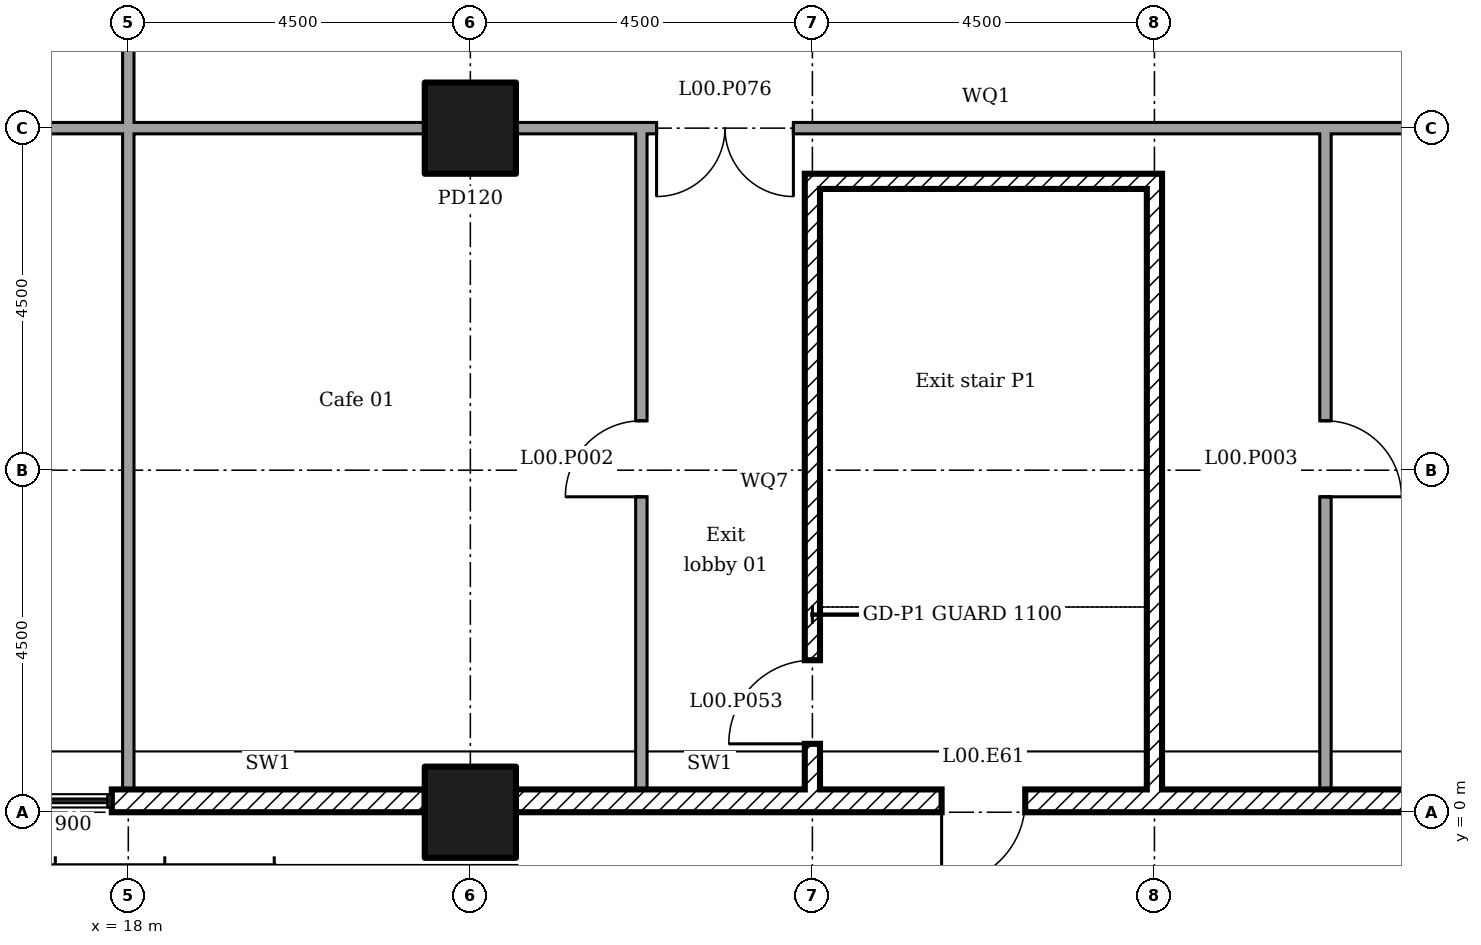
"""IFC4 building model, lengths in metres.
Left out: names, types, materials, properties, quantities, classifications, styles, units other than length and angle.
Written with IfcOpenShell. Run it as: python <this file> out.ifc"""

import sys

from ifc_helpers import new_model, si_unit, direction, frame, frame_2d, origin, origin_2d, place, context, subcontext, project, spatial, rectangle, extrude, element, fill, save


model = new_model("IFC4")
c1 = context("Model", 3, precision=1e-05, world=origin(), true_north=direction((0.0, 1.0)))
c2 = subcontext(c1, "Body", "Model", "MODEL_VIEW")
j1 = project(units=[si_unit("LENGTHUNIT", "METRE"), si_unit("PLANEANGLEUNIT", "RADIAN")], contexts=[c1])
p1 = place(None, origin())
s1 = spatial("IfcSite", under=j1, at=p1, CompositionType="ELEMENT")
p2 = place(p1, origin())
s2 = spatial("IfcBuilding", under=s1, at=p2, CompositionType="ELEMENT")
p3 = place(p2, origin())
s3 = spatial("IfcBuildingStorey", under=s2, at=p3, CompositionType="ELEMENT", Elevation=0.0)
for number, where in (
    (1, (22.5, 0.0, 0.0)),
    (2, (22.5, 9.0, 0.0)),
):
    element("IfcColumn", number, at=place(p3, frame(where)), inside=s3, PredefinedType="COLUMN", context=c2, shape_type="SweptSolid", body=[
        extrude(rectangle(XDim=1.2, YDim=1.2, at=origin_2d()), origin(), (0.0, 0.0, 1.0), 6.0),
    ])
p4 = place(p3, frame((17.783, 0.15, 0.0)))
e3 = element("IfcWall", 3, at=p4, inside=s3, PredefinedType="ELEMENTEDWALL", context=c2, shape_type="SweptSolid", body=[
    extrude(rectangle(XDim=4.116, YDim=0.3, at=frame_2d((2.058, 0.0))), origin(), (0.0, 0.0, 1.0), 5.55),
])
p5 = place(p3, frame((23.1, 0.15, 0.0)))
e4 = element("IfcWall", 4, at=p5, inside=s3, PredefinedType="ELEMENTEDWALL", context=c2, shape_type="SweptSolid", body=[
    extrude(rectangle(XDim=5.1, YDim=0.3, at=frame_2d((2.55, 0.0))), origin(), (0.0, 0.0, 1.0), 5.55),
])
p6 = place(p3, frame((28.2, 0.15, 0.0)))
e5 = element("IfcWall", 5, at=p6, inside=s3, PredefinedType="ELEMENTEDWALL", context=c2, shape_type="SweptSolid", body=[
    extrude(rectangle(XDim=2.1, YDim=0.3, at=frame_2d((1.05, 0.0))), origin(), (0.0, 0.0, 1.0), 5.55),
])
p7 = place(p6, frame((0.5, 0.0, 0.0)))
e6 = element("IfcOpeningElement", 6, at=p7, cuts=e5, PredefinedType="OPENING", context=c2, shape_type="SweptSolid", body=[
    extrude(rectangle(XDim=1.1, YDim=2.4, at=frame_2d((0.55, 1.2))), frame((0.0, 0.16, 0.0), z_axis=(0.0, -1.0, 0.0), x_axis=(1.0, 0.0, 0.0)), (0.0, 0.0, 1.0), 0.32),
])
p8 = place(p3, frame((30.3, 0.15, 0.0)))
e7 = element("IfcWall", 7, at=p8, inside=s3, PredefinedType="ELEMENTEDWALL", context=c2, shape_type="SweptSolid", body=[
    extrude(rectangle(XDim=5.1, YDim=0.3, at=frame_2d((2.55, 0.0))), origin(), (0.0, 0.0, 1.0), 5.55),
])
p9 = place(p3, frame((18.0, 0.3, 0.0), z_axis=(0.0, 0.0, 1.0), x_axis=(0.0, 1.0, 0.0)))
e8 = element("IfcWall", 8, at=p9, inside=s3, PredefinedType="PARTITIONING", context=c2, shape_type="SweptSolid", body=[
    extrude(rectangle(XDim=8.775, YDim=0.15, at=frame_2d((4.387, 0.0))), origin(), (0.0, 0.0, 1.0), 5.55),
])
p10 = place(p3, frame((9.595, 9.0, 0.0)))
e9 = element("IfcWall", 9, at=p10, inside=s3, PredefinedType="PARTITIONING", context=c2, shape_type="SweptSolid", body=[
    extrude(rectangle(XDim=8.48, YDim=0.15, at=frame_2d((4.24, 0.0))), origin(), (0.0, 0.0, 1.0), 5.55),
])
p11 = place(p10, frame((3.7, 0.0, 0.0)))
e10 = element("IfcOpeningElement", 10, at=p11, cuts=e9, PredefinedType="OPENING", context=c2, shape_type="SweptSolid", body=[
    extrude(rectangle(XDim=1.0, YDim=2.1, at=frame_2d((0.5, 1.05))), frame((0.0, 0.085, 0.0), z_axis=(0.0, -1.0, 0.0), x_axis=(1.0, 0.0, 0.0)), (0.0, 0.0, 1.0), 0.17),
])
p12 = place(p3, frame((24.75, 0.3, 0.0), z_axis=(0.0, 0.0, 1.0), x_axis=(0.0, 1.0, 0.0)))
e11 = element("IfcWall", 11, at=p12, inside=s3, PredefinedType="PARTITIONING", context=c2, shape_type="SweptSolid", body=[
    extrude(rectangle(XDim=8.775, YDim=0.15, at=frame_2d((4.387, 0.0))), origin(), (0.0, 0.0, 1.0), 5.55),
])
p13 = place(p12, frame((3.85, 0.0, 0.0)))
e12 = element("IfcOpeningElement", 12, at=p13, cuts=e11, PredefinedType="OPENING", context=c2, shape_type="SweptSolid", body=[
    extrude(rectangle(XDim=1.0, YDim=2.1, at=frame_2d((0.5, 1.05))), frame((0.0, 0.085, 0.0), z_axis=(0.0, -1.0, 0.0), x_axis=(1.0, 0.0, 0.0)), (0.0, 0.0, 1.0), 0.17),
])
p14 = place(p3, frame((18.075, 9.0, 0.0)))
e13 = element("IfcWall", 13, at=p14, inside=s3, PredefinedType="PARTITIONING", context=c2, shape_type="SweptSolid", body=[
    extrude(rectangle(XDim=3.83, YDim=0.15, at=frame_2d((1.915, 0.0))), origin(), (0.0, 0.0, 1.0), 5.55),
])
p15 = place(p3, frame((23.095, 9.0, 0.0)))
e14 = element("IfcWall", 14, at=p15, inside=s3, PredefinedType="PARTITIONING", context=c2, shape_type="SweptSolid", body=[
    extrude(rectangle(XDim=1.655, YDim=0.15, at=frame_2d((0.828, 0.0))), origin(), (0.0, 0.0, 1.0), 5.55),
])
p16 = place(p3, frame((33.75, 0.3, 0.0), z_axis=(0.0, 0.0, 1.0), x_axis=(0.0, 1.0, 0.0)))
e15 = element("IfcWall", 15, at=p16, inside=s3, PredefinedType="PARTITIONING", context=c2, shape_type="SweptSolid", body=[
    extrude(rectangle(XDim=8.775, YDim=0.15, at=frame_2d((4.387, 0.0))), origin(), (0.0, 0.0, 1.0), 5.55),
])
p17 = place(p16, frame((3.85, 0.0, 0.0)))
e16 = element("IfcOpeningElement", 16, at=p17, cuts=e15, PredefinedType="OPENING", context=c2, shape_type="SweptSolid", body=[
    extrude(rectangle(XDim=1.0, YDim=2.1, at=frame_2d((0.5, 1.05))), frame((0.0, 0.085, 0.0), z_axis=(0.0, -1.0, 0.0), x_axis=(1.0, 0.0, 0.0)), (0.0, 0.0, 1.0), 0.17),
])
p18 = place(p3, frame((24.825, 9.0, 0.0)))
e17 = element("IfcWall", 17, at=p18, inside=s3, PredefinedType="PARTITIONING", context=c2, shape_type="SweptSolid", body=[
    extrude(rectangle(XDim=8.925, YDim=0.15, at=frame_2d((4.462, 0.0))), origin(), (0.0, 0.0, 1.0), 5.55),
])
p19 = place(p18, frame((0.125, 0.0, 0.0)))
e18 = element("IfcOpeningElement", 18, at=p19, cuts=e17, PredefinedType="OPENING", context=c2, shape_type="SweptSolid", body=[
    extrude(rectangle(XDim=1.8, YDim=2.1, at=frame_2d((0.9, 1.05))), frame((0.0, 0.085, 0.0), z_axis=(0.0, -1.0, 0.0), x_axis=(1.0, 0.0, 0.0)), (0.0, 0.0, 1.0), 0.17),
])
p20 = place(p3, frame((27.0, 0.3, 0.0), z_axis=(0.0, 0.0, 1.0), x_axis=(0.0, 1.0, 0.0)))
e19 = element("IfcWall", 19, at=p20, inside=s3, PredefinedType="SOLIDWALL", context=c2, shape_type="SweptSolid", body=[
    extrude(rectangle(XDim=8.1, YDim=0.2, at=frame_2d((4.05, 0.0))), origin(), (0.0, 0.0, 1.0), 5.55),
])
p21 = place(p20, frame((0.6, 0.0, 0.0)))
e20 = element("IfcOpeningElement", 20, at=p21, cuts=e19, PredefinedType="OPENING", context=c2, shape_type="SweptSolid", body=[
    extrude(rectangle(XDim=1.1, YDim=2.1, at=frame_2d((0.55, 1.05))), frame((0.0, 0.11, 0.0), z_axis=(0.0, -1.0, 0.0), x_axis=(1.0, 0.0, 0.0)), (0.0, 0.0, 1.0), 0.22),
])
p22 = place(p3, frame((31.5, 0.3, 0.0), z_axis=(0.0, 0.0, 1.0), x_axis=(0.0, 1.0, 0.0)))
e21 = element("IfcWall", 21, at=p22, inside=s3, PredefinedType="SOLIDWALL", context=c2, shape_type="SweptSolid", body=[
    extrude(rectangle(XDim=8.1, YDim=0.2, at=frame_2d((4.05, 0.0))), origin(), (0.0, 0.0, 1.0), 5.55),
])
p23 = place(p3, frame((27.1, 8.3, 0.0)))
e22 = element("IfcWall", 22, at=p23, inside=s3, PredefinedType="SOLIDWALL", context=c2, shape_type="SweptSolid", body=[
    extrude(rectangle(XDim=4.3, YDim=0.2, at=frame_2d((2.15, 0.0))), origin(), (0.0, 0.0, 1.0), 5.55),
])
p24 = place(p3, frame((33.825, 9.0, 0.0)))
e23 = element("IfcWall", 23, at=p24, inside=s3, PredefinedType="PARTITIONING", context=c2, shape_type="SweptSolid", body=[
    extrude(rectangle(XDim=1.58, YDim=0.15, at=frame_2d((0.79, 0.0))), origin(), (0.0, 0.0, 1.0), 5.55),
])
p25 = place(p3, frame((18.0, 9.075, 0.0), z_axis=(0.0, 0.0, 1.0), x_axis=(0.0, 1.0, 0.0)))
e24 = element("IfcWall", 24, at=p25, inside=s3, PredefinedType="PARTITIONING", context=c2, shape_type="SweptSolid", body=[
    extrude(rectangle(XDim=9.0, YDim=0.15, at=frame_2d((4.5, 0.0))), origin(), (0.0, 0.0, 1.0), 5.55),
])
p26 = place(p25, frame((3.525, 0.0, 0.0)))
e25 = element("IfcOpeningElement", 25, at=p26, cuts=e24, PredefinedType="OPENING", context=c2, shape_type="SweptSolid", body=[
    extrude(rectangle(XDim=1.8, YDim=2.1, at=frame_2d((0.9, 1.05))), frame((0.0, 0.085, 0.0), z_axis=(0.0, -1.0, 0.0), x_axis=(1.0, 0.0, 0.0)), (0.0, 0.0, 1.0), 0.17),
])
p27 = place(p7, frame((1.1, 0.0, 0.0), x_axis=(-1.0, 0.0, 0.0)))
e26 = element("IfcDoor", 26, at=p27, inside=s3, OperationType="SINGLE_SWING_LEFT", PredefinedType="NOTDEFINED", context=c2, shape_type="SweptSolid", body=[
    extrude(rectangle(XDim=1.1, YDim=2.4, at=frame_2d((0.55, 1.2))), frame((0.0, 0.025, 0.0), z_axis=(0.0, -1.0, 0.0), x_axis=(1.0, 0.0, 0.0)), (0.0, 0.0, 1.0), 0.05),
])
fill(e6, e26)
p28 = place(p13, origin())
e27 = element("IfcDoor", 27, at=p28, inside=s3, OperationType="SINGLE_SWING_RIGHT", PredefinedType="DOOR", context=c2, shape_type="SweptSolid", body=[
    extrude(rectangle(XDim=1.0, YDim=2.1, at=frame_2d((0.5, 1.05))), frame((0.0, 0.025, 0.0), z_axis=(0.0, -1.0, 0.0), x_axis=(1.0, 0.0, 0.0)), (0.0, 0.0, 1.0), 0.05),
])
fill(e12, e27)
p29 = place(p17, frame((1.0, 0.0, 0.0), x_axis=(-1.0, 0.0, 0.0)))
e28 = element("IfcDoor", 28, at=p29, inside=s3, OperationType="SINGLE_SWING_LEFT", PredefinedType="DOOR", context=c2, shape_type="SweptSolid", body=[
    extrude(rectangle(XDim=1.0, YDim=2.1, at=frame_2d((0.5, 1.05))), frame((0.0, 0.025, 0.0), z_axis=(0.0, -1.0, 0.0), x_axis=(1.0, 0.0, 0.0)), (0.0, 0.0, 1.0), 0.05),
])
fill(e16, e28)
p30 = place(p21, origin())
e29 = element("IfcDoor", 29, at=p30, inside=s3, OperationType="SINGLE_SWING_RIGHT", PredefinedType="DOOR", context=c2, shape_type="SweptSolid", body=[
    extrude(rectangle(XDim=1.1, YDim=2.1, at=frame_2d((0.55, 1.05))), frame((0.0, 0.025, 0.0), z_axis=(0.0, -1.0, 0.0), x_axis=(1.0, 0.0, 0.0)), (0.0, 0.0, 1.0), 0.05),
])
fill(e20, e29)
p31 = place(p19, frame((1.8, 0.0, 0.0), x_axis=(-1.0, 0.0, 0.0)))
e30 = element("IfcDoor", 30, at=p31, inside=s3, OperationType="DOUBLE_DOOR_SINGLE_SWING", PredefinedType="DOOR", context=c2, shape_type="SweptSolid", body=[
    extrude(rectangle(XDim=1.8, YDim=2.1, at=frame_2d((0.9, 1.05))), frame((0.0, 0.025, 0.0), z_axis=(0.0, -1.0, 0.0), x_axis=(1.0, 0.0, 0.0)), (0.0, 0.0, 1.0), 0.05),
])
fill(e18, e30)
save(model, sys.argv[1])
